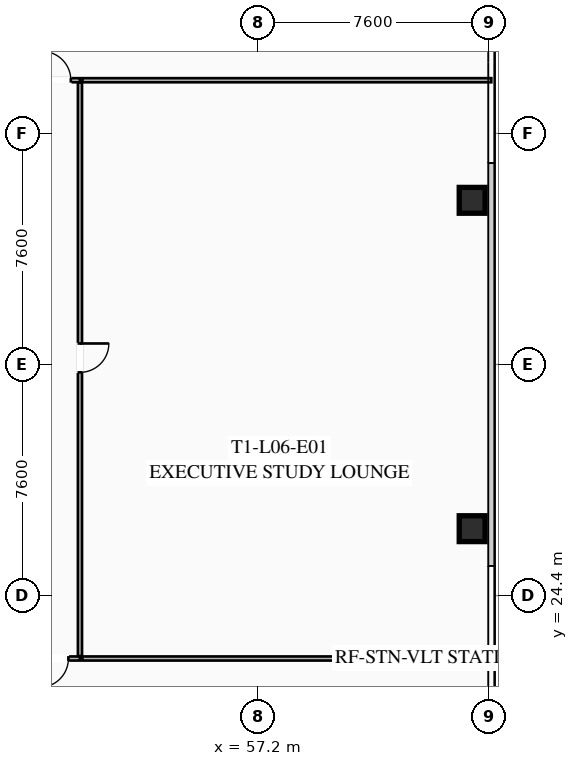
"""IFC4 building model, lengths in metres.
Left out: names, types, materials, properties, quantities, classifications, styles, units other than length and angle.
Written with IfcOpenShell. Run it as: python <this file> out.ifc"""

import sys

from ifc_helpers import new_model, si_unit, direction, frame, frame_2d, origin, origin_2d, place, context, subcontext, project, spatial, rectangle, hollow_rectangle, extrude, element, fill, save


model = new_model("IFC4")
c1 = context("Model", 3, precision=1e-05, world=origin(), true_north=direction((0.0, 1.0)))
c2 = subcontext(c1, "Body", "Model", "MODEL_VIEW")
j1 = project(units=[si_unit("LENGTHUNIT", "METRE"), si_unit("PLANEANGLEUNIT", "RADIAN")], contexts=[c1])
p1 = place(None, origin())
s1 = spatial("IfcSite", under=j1, at=p1, CompositionType="ELEMENT")
p2 = place(p1, origin())
s2 = spatial("IfcBuilding", under=s1, at=p2, CompositionType="ELEMENT")
p3 = place(p2, frame((0.0, 0.0, 28.15)))
s3 = spatial("IfcBuildingStorey", under=s2, at=p3, CompositionType="ELEMENT", Elevation=28.15)
for number, where, z_axis, x_axis in (
    (1, (64.25, 26.6, 0.0), (0.0, 0.0, 1.0), (1.0, 0.0, 0.0)),
    (2, (64.25, 37.4, 0.0), (0.0, 0.0, 1.0), (1.0, 0.0, 0.0)),
):
    element("IfcColumn", number, at=place(p3, frame(where, z_axis=z_axis, x_axis=x_axis)), inside=s3, PredefinedType="COLUMN", context=c2, shape_type="SweptSolid", body=[
        extrude(hollow_rectangle(XDim=0.85, YDim=0.85, WallThickness=0.035, at=origin_2d()), origin(), (0.0, 0.0, 1.0), 3.35),
    ])
p4 = place(p3, frame((22.35, 41.35, 0.0), z_axis=(0.0, 0.0, 1.0), x_axis=(1.0, 0.0, 0.0)))
e3 = element("IfcWall", 3, at=p4, inside=s3, PredefinedType="PARTITIONING", context=c2, shape_type="SweptSolid", body=[
    extrude(rectangle(XDim=29.0, YDim=0.135, at=frame_2d((14.5, 0.0))), origin(), (0.0, 0.0, 1.0), 2.703),
])
p5 = place(p4, frame((0.3, 0.0, 0.0)))
e4 = element("IfcOpeningElement", 4, at=p5, cuts=e3, PredefinedType="OPENING", context=c2, shape_type="SweptSolid", body=[
    extrude(rectangle(XDim=0.95, YDim=2.05, at=frame_2d((0.475, 1.025))), frame((0.0, 0.077, 0.0), z_axis=(0.0, -1.0, 0.0), x_axis=(1.0, 0.0, 0.0)), (0.0, 0.0, 1.0), 0.155),
])
p6 = place(p4, frame((19.299, 0.0, 0.0)))
e5 = element("IfcOpeningElement", 5, at=p6, cuts=e3, PredefinedType="OPENING", context=c2, shape_type="SweptSolid", body=[
    extrude(rectangle(XDim=0.95, YDim=2.05, at=frame_2d((0.475, 1.025))), frame((0.0, 0.077, 0.0), z_axis=(0.0, -1.0, 0.0), x_axis=(1.0, 0.0, 0.0)), (0.0, 0.0, 1.0), 0.155),
])
p7 = place(p4, frame((27.75, 0.0, 0.0)))
e6 = element("IfcOpeningElement", 6, at=p7, cuts=e3, PredefinedType="OPENING", context=c2, shape_type="SweptSolid", body=[
    extrude(rectangle(XDim=0.95, YDim=2.05, at=frame_2d((0.475, 1.025))), frame((0.0, 0.077, 0.0), z_axis=(0.0, -1.0, 0.0), x_axis=(1.0, 0.0, 0.0)), (0.0, 0.0, 1.0), 0.155),
])
p8 = place(p3, frame((51.35, 22.33, 0.0), z_axis=(0.0, 0.0, 1.0), x_axis=(-1.0, 0.0, 0.0)))
e7 = element("IfcWall", 7, at=p8, inside=s3, PredefinedType="PARTITIONING", context=c2, shape_type="SweptSolid", body=[
    extrude(rectangle(XDim=29.0, YDim=0.135, at=frame_2d((14.5, 0.0))), origin(), (0.0, 0.0, 1.0), 2.703),
])
p9 = place(p8, frame((27.67, 0.0, 0.0)))
e8 = element("IfcOpeningElement", 8, at=p9, cuts=e7, PredefinedType="OPENING", context=c2, shape_type="SweptSolid", body=[
    extrude(rectangle(XDim=0.95, YDim=2.05, at=frame_2d((0.475, 1.025))), frame((0.0, 0.077, 0.0), z_axis=(0.0, -1.0, 0.0), x_axis=(1.0, 0.0, 0.0)), (0.0, 0.0, 1.0), 0.155),
])
p10 = place(p8, frame((8.775, 0.0, 0.0)))
e9 = element("IfcOpeningElement", 9, at=p10, cuts=e7, PredefinedType="OPENING", context=c2, shape_type="SweptSolid", body=[
    extrude(rectangle(XDim=0.95, YDim=2.05, at=frame_2d((0.475, 1.025))), frame((0.0, 0.077, 0.0), z_axis=(0.0, -1.0, 0.0), x_axis=(1.0, 0.0, 0.0)), (0.0, 0.0, 1.0), 0.155),
])
p11 = place(p8, frame((0.38, 0.0, 0.0)))
e10 = element("IfcOpeningElement", 10, at=p11, cuts=e7, PredefinedType="OPENING", context=c2, shape_type="SweptSolid", body=[
    extrude(rectangle(XDim=0.95, YDim=2.05, at=frame_2d((0.475, 1.025))), frame((0.0, 0.077, 0.0), z_axis=(0.0, -1.0, 0.0), x_axis=(1.0, 0.0, 0.0)), (0.0, 0.0, 1.0), 0.155),
])
p12 = place(p3, frame((51.35, 41.27, 0.0), z_axis=(0.0, 0.0, 1.0), x_axis=(0.0, -1.0, 0.0)))
e11 = element("IfcWall", 11, at=p12, inside=s3, PredefinedType="PARTITIONING", context=c2, shape_type="SweptSolid", body=[
    extrude(rectangle(XDim=18.86, YDim=0.135, at=frame_2d((9.43, 0.0))), origin(), (0.0, 0.0, 1.0), 2.703),
])
p13 = place(p12, frame((8.579, 0.0, 0.0)))
e12 = element("IfcOpeningElement", 12, at=p13, cuts=e11, PredefinedType="OPENING", context=c2, shape_type="SweptSolid", body=[
    extrude(rectangle(XDim=0.95, YDim=2.05, at=frame_2d((0.475, 1.025))), frame((0.0, 0.077, 0.0), z_axis=(0.0, -1.0, 0.0), x_axis=(1.0, 0.0, 0.0)), (0.0, 0.0, 1.0), 0.155),
])
for number, where, z_axis, x_axis in (
    (13, (64.88, 41.35, 0.0), (0.0, 0.0, 1.0), (-1.0, 0.0, 0.0)),
    (14, (51.43, 22.33, 0.0), (0.0, 0.0, 1.0), (1.0, 0.0, 0.0)),
):
    element("IfcWall", number, at=place(p3, frame(where, z_axis=z_axis, x_axis=x_axis)), inside=s3, PredefinedType="PARTITIONING", context=c2, shape_type="SweptSolid", body=[
        extrude(rectangle(XDim=13.45, YDim=0.135, at=frame_2d((6.725, 0.0))), origin(), (0.0, 0.0, 1.0), 2.703),
    ])
p14 = place(p7, origin())
e15 = element("IfcDoor", 15, at=p14, inside=s3, OperationType="SINGLE_SWING_LEFT", PredefinedType="DOOR", context=c2, shape_type="SweptSolid", body=[
    extrude(rectangle(XDim=0.95, YDim=2.05, at=frame_2d((0.475, 1.025))), frame((0.0, 0.025, 0.0), z_axis=(0.0, -1.0, 0.0), x_axis=(1.0, 0.0, 0.0)), (0.0, 0.0, 1.0), 0.05),
])
fill(e6, e15)
p15 = place(p11, origin())
e16 = element("IfcDoor", 16, at=p15, inside=s3, OperationType="SINGLE_SWING_RIGHT", PredefinedType="DOOR", context=c2, shape_type="SweptSolid", body=[
    extrude(rectangle(XDim=0.95, YDim=2.05, at=frame_2d((0.475, 1.025))), frame((0.0, 0.025, 0.0), z_axis=(0.0, -1.0, 0.0), x_axis=(1.0, 0.0, 0.0)), (0.0, 0.0, 1.0), 0.05),
])
fill(e10, e16)
p16 = place(p13, origin())
e17 = element("IfcDoor", 17, at=p16, inside=s3, OperationType="SINGLE_SWING_LEFT", PredefinedType="DOOR", context=c2, shape_type="SweptSolid", body=[
    extrude(rectangle(XDim=0.95, YDim=2.05, at=frame_2d((0.475, 1.025))), frame((0.0, 0.025, 0.0), z_axis=(0.0, -1.0, 0.0), x_axis=(1.0, 0.0, 0.0)), (0.0, 0.0, 1.0), 0.05),
])
fill(e12, e17)
save(model, sys.argv[1])
